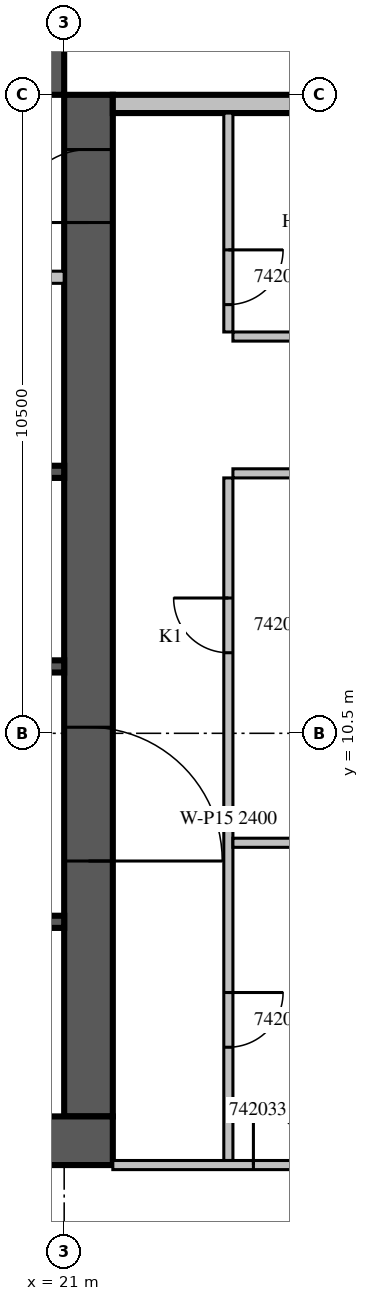
"""IFC4 building model, lengths in metres.
Left out: names, types, materials, properties, quantities, classifications, styles, units other than length and angle.
Written with IfcOpenShell. Run it as: python <this file> out.ifc"""

import sys

from ifc_helpers import new_model, si_unit, direction, frame, frame_2d, origin, place, context, subcontext, project, spatial, rectangle, extrude, source, transform, mapped, element, fill, save


model = new_model("IFC4")
c1 = context("Model", 3, precision=1e-05, world=origin(), true_north=direction((0.0, 1.0)))
c2 = subcontext(c1, "Body", "Model", "MODEL_VIEW")
j1 = project(units=[si_unit("LENGTHUNIT", "METRE"), si_unit("PLANEANGLEUNIT", "RADIAN")], contexts=[c1])
p1 = place(None, origin())
s1 = spatial("IfcSite", under=j1, at=p1, CompositionType="ELEMENT")
p2 = place(p1, origin())
s2 = spatial("IfcBuilding", under=s1, at=p2, CompositionType="ELEMENT")
p3 = place(p2, frame((0.0, 0.0, 193.0)))
s3 = spatial("IfcBuildingStorey", under=s2, at=p3, CompositionType="ELEMENT", Elevation=193.0)
m1 = source(origin(), c2, "Body", "SweptSolid", [
    extrude(rectangle(XDim=16.8, YDim=0.8, at=frame_2d((8.4, 0.0))), origin(), (0.0, 0.0, 1.0), 3.8),
])
p4 = place(p3, frame((21.4, 4.2, 0.0), z_axis=(0.0, 0.0, 1.0), x_axis=(0.0, 1.0, 0.0)))
e1 = element("IfcWall", 1, at=p4, inside=s3, PredefinedType="SHEAR", context=c2, shape_type="MappedRepresentation", body=[
    mapped(m1, transform((0.0, 0.0, 0.0), scale=1.0)),
])
m2 = source(origin(), c2, "Body", "SweptSolid", [
    extrude(rectangle(XDim=2.2, YDim=2.1, at=frame_2d((1.1, 1.05))), frame((0.0, 0.41, 0.0), z_axis=(0.0, -1.0, 0.0), x_axis=(1.0, 0.0, 0.0)), (0.0, 0.0, 1.0), 0.82),
])
p5 = place(p4, frame((4.2, 0.0, 0.0)))
e2 = element("IfcOpeningElement", 2, at=p5, cuts=e1, PredefinedType="OPENING", context=c2, shape_type="MappedRepresentation", body=[
    mapped(m2, transform((0.0, 0.0, 0.0), scale=1.0)),
])
m3 = source(origin(), c2, "Body", "SweptSolid", [
    extrude(rectangle(XDim=1.2, YDim=2.1, at=frame_2d((0.6, 1.05))), frame((0.0, 0.41, 0.0), z_axis=(0.0, -1.0, 0.0), x_axis=(1.0, 0.0, 0.0)), (0.0, 0.0, 1.0), 0.82),
])
p6 = place(p4, frame((14.7, 0.0, 0.0)))
e3 = element("IfcOpeningElement", 3, at=p6, cuts=e1, PredefinedType="OPENING", context=c2, shape_type="MappedRepresentation", body=[
    mapped(m3, transform((0.0, 0.0, 0.0), scale=1.0)),
])
m4 = source(origin(), c2, "Body", "SweptSolid", [
    extrude(rectangle(XDim=17.6, YDim=0.8, at=frame_2d((8.8, 0.0))), origin(), (0.0, 0.0, 1.0), 3.8),
])
p7 = place(p3, frame((4.2, 3.8, 0.0), z_axis=(0.0, 0.0, 1.0), x_axis=(1.0, 0.0, 0.0)))
e4 = element("IfcWall", 4, at=p7, inside=s3, PredefinedType="SHEAR", context=c2, shape_type="MappedRepresentation", body=[
    mapped(m4, transform((0.0, 0.0, 0.0), scale=1.0)),
])
m5 = source(origin(), c2, "Body", "SweptSolid", [
    extrude(rectangle(XDim=0.9, YDim=2.1, at=frame_2d((0.45, 1.05))), frame((0.0, 0.41, 0.0), z_axis=(0.0, -1.0, 0.0), x_axis=(1.0, 0.0, 0.0)), (0.0, 0.0, 1.0), 0.82),
])
p8 = place(p7, frame((12.75, 0.0, 0.0)))
e5 = element("IfcOpeningElement", 5, at=p8, cuts=e4, PredefinedType="OPENING", context=c2, shape_type="MappedRepresentation", body=[
    mapped(m5, transform((0.0, 0.0, 0.0), scale=1.0)),
])
p9 = place(p3, frame((4.2, 21.4, 0.0), z_axis=(0.0, 0.0, 1.0), x_axis=(1.0, 0.0, 0.0)))
e6 = element("IfcWall", 6, at=p9, inside=s3, PredefinedType="SHEAR", context=c2, shape_type="MappedRepresentation", body=[
    mapped(m1, transform((0.0, 0.0, 0.0), scale=1.0)),
])
p10 = place(p9, frame((7.4, 0.0, 0.0)))
e7 = element("IfcOpeningElement", 7, at=p10, cuts=e6, PredefinedType="OPENING", context=c2, shape_type="MappedRepresentation", body=[
    mapped(m3, transform((0.0, 0.0, 0.0), scale=1.0)),
])
m6 = source(origin(), c2, "Body", "SweptSolid", [
    extrude(rectangle(XDim=7.15, YDim=0.3, at=frame_2d((3.575, 0.0))), origin(), (0.0, 0.0, 1.0), 3.4),
])
p11 = place(p3, frame((28.95, 20.85, 0.0), z_axis=(0.0, 0.0, 1.0), x_axis=(-1.0, 0.0, 0.0)))
e8 = element("IfcWall", 8, at=p11, inside=s3, PredefinedType="STANDARD", context=c2, shape_type="MappedRepresentation", body=[
    mapped(m6, transform((0.0, 0.0, 0.0), scale=1.0)),
])
m7 = source(origin(), c2, "Body", "SweptSolid", [
    extrude(rectangle(XDim=3.0, YDim=2.3, at=frame_2d((1.5, 1.15))), frame((0.0, 0.16, 0.0), z_axis=(0.0, -1.0, 0.0), x_axis=(1.0, 0.0, 0.0)), (0.0, 0.0, 1.0), 0.32),
])
p12 = place(p11, frame((0.15, 0.0, 0.6)))
e9 = element("IfcOpeningElement", 9, at=p12, cuts=e8, PredefinedType="OPENING", context=c2, shape_type="MappedRepresentation", body=[
    mapped(m7, transform((0.0, 0.0, 0.0), scale=1.0)),
])
m8 = source(origin(), c2, "Body", "SweptSolid", [
    extrude(rectangle(XDim=2.4, YDim=0.2, at=frame_2d((1.2, 0.0))), origin(), (0.0, 0.0, 1.0), 3.8),
])
p13 = place(p3, frame((18.6, 7.4, 0.0), z_axis=(0.0, 0.0, 1.0), x_axis=(1.0, 0.0, 0.0)))
e10 = element("IfcWall", 10, at=p13, inside=s3, PredefinedType="SOLIDWALL", context=c2, shape_type="MappedRepresentation", body=[
    mapped(m8, transform((0.0, 0.0, 0.0), scale=1.0)),
])
m9 = source(origin(), c2, "Body", "SweptSolid", [
    extrude(rectangle(XDim=9.6, YDim=0.2, at=frame_2d((4.8, 0.0))), origin(), (0.0, 0.0, 1.0), 3.8),
])
p14 = place(p3, frame((11.4, 11.6, 0.0), z_axis=(0.0, 0.0, 1.0), x_axis=(1.0, 0.0, 0.0)))
e11 = element("IfcWall", 11, at=p14, inside=s3, PredefinedType="SOLIDWALL", context=c2, shape_type="MappedRepresentation", body=[
    mapped(m9, transform((0.0, 0.0, 0.0), scale=1.0)),
])
p15 = place(p3, frame((11.4, 14.8, 0.0), z_axis=(0.0, 0.0, 1.0), x_axis=(1.0, 0.0, 0.0)))
e12 = element("IfcWall", 12, at=p15, inside=s3, PredefinedType="SOLIDWALL", context=c2, shape_type="MappedRepresentation", body=[
    mapped(m9, transform((0.0, 0.0, 0.0), scale=1.0)),
])
m10 = source(origin(), c2, "Body", "SweptSolid", [
    extrude(rectangle(XDim=1.1, YDim=2.1, at=frame_2d((0.55, 1.05))), frame((0.0, 0.11, 0.0), z_axis=(0.0, -1.0, 0.0), x_axis=(1.0, 0.0, 0.0)), (0.0, 0.0, 1.0), 0.22),
])
p16 = place(p15, frame((3.05, 0.0, 0.0)))
e13 = element("IfcOpeningElement", 13, at=p16, cuts=e12, PredefinedType="OPENING", context=c2, shape_type="MappedRepresentation", body=[
    mapped(m10, transform((0.0, 0.0, 0.0), scale=1.0)),
])
p17 = place(p15, frame((5.45, 0.0, 0.0)))
e14 = element("IfcOpeningElement", 14, at=p17, cuts=e12, PredefinedType="OPENING", context=c2, shape_type="MappedRepresentation", body=[
    mapped(m10, transform((0.0, 0.0, 0.0), scale=1.0)),
])
p18 = place(p15, frame((7.85, 0.0, 0.0)))
e15 = element("IfcOpeningElement", 15, at=p18, cuts=e12, PredefinedType="OPENING", context=c2, shape_type="MappedRepresentation", body=[
    mapped(m10, transform((0.0, 0.0, 0.0), scale=1.0)),
])
m11 = source(origin(), c2, "Body", "SweptSolid", [
    extrude(rectangle(XDim=11.45, YDim=0.2, at=frame_2d((5.725, 0.0))), origin(), (0.0, 0.0, 1.0), 3.4),
])
p19 = place(p3, frame((9.55, 18.0, 0.0), z_axis=(0.0, 0.0, 1.0), x_axis=(1.0, 0.0, 0.0)))
e16 = element("IfcWall", 16, at=p19, inside=s3, PredefinedType="PARTITIONING", context=c2, shape_type="MappedRepresentation", body=[
    mapped(m11, transform((0.0, 0.0, 0.0), scale=1.0)),
])
m12 = source(origin(), c2, "Body", "SweptSolid", [
    extrude(rectangle(XDim=0.9, YDim=2.1, at=frame_2d((0.45, 1.05))), frame((0.0, 0.11, 0.0), z_axis=(0.0, -1.0, 0.0), x_axis=(1.0, 0.0, 0.0)), (0.0, 0.0, 1.0), 0.22),
])
p20 = place(p19, frame((0.475, 0.0, 0.0)))
e17 = element("IfcOpeningElement", 17, at=p20, cuts=e16, PredefinedType="OPENING", context=c2, shape_type="MappedRepresentation", body=[
    mapped(m12, transform((0.0, 0.0, 0.0), scale=1.0)),
])
p21 = place(p19, frame((1.85, 0.0, 0.0)))
e18 = element("IfcOpeningElement", 18, at=p21, cuts=e16, PredefinedType="OPENING", context=c2, shape_type="MappedRepresentation", body=[
    mapped(m12, transform((0.0, 0.0, 0.0), scale=1.0)),
])
p22 = place(p19, frame((3.125, 0.0, 0.0)))
e19 = element("IfcOpeningElement", 19, at=p22, cuts=e16, PredefinedType="OPENING", context=c2, shape_type="MappedRepresentation", body=[
    mapped(m12, transform((0.0, 0.0, 0.0), scale=1.0)),
])
p23 = place(p19, frame((7.35, 0.0, 0.0)))
e20 = element("IfcOpeningElement", 20, at=p23, cuts=e16, PredefinedType="OPENING", context=c2, shape_type="MappedRepresentation", body=[
    mapped(m10, transform((0.0, 0.0, 0.0), scale=1.0)),
])
p24 = place(p3, frame((23.7, 14.7, 0.0), z_axis=(0.0, 0.0, 1.0), x_axis=(0.0, -1.0, 0.0)))
e21 = element("IfcWall", 21, at=p24, inside=s3, PredefinedType="PARTITIONING", context=c2, shape_type="SweptSolid", body=[
    extrude(rectangle(XDim=11.225, YDim=0.15, at=frame_2d((5.612, 0.0))), origin(), (0.0, 0.0, 1.0), 2.4),
])
m13 = source(origin(), c2, "Body", "SweptSolid", [
    extrude(rectangle(XDim=0.9, YDim=2.1, at=frame_2d((0.45, 1.05))), frame((0.0, 0.085, 0.0), z_axis=(0.0, -1.0, 0.0), x_axis=(1.0, 0.0, 0.0)), (0.0, 0.0, 1.0), 0.17),
])
p25 = place(p24, frame((8.463, 0.0, 0.0)))
e22 = element("IfcOpeningElement", 22, at=p25, cuts=e21, PredefinedType="OPENING", context=c2, shape_type="MappedRepresentation", body=[
    mapped(m13, transform((0.0, 0.0, 0.0), scale=1.0)),
])
p26 = place(p24, frame((1.975, 0.0, 0.0)))
e23 = element("IfcOpeningElement", 23, at=p26, cuts=e21, PredefinedType="OPENING", context=c2, shape_type="MappedRepresentation", body=[
    mapped(m13, transform((0.0, 0.0, 0.0), scale=1.0)),
])
m14 = source(origin(), c2, "Body", "SweptSolid", [
    extrude(rectangle(XDim=3.6, YDim=0.15, at=frame_2d((1.8, 0.0))), origin(), (0.0, 0.0, 1.0), 3.4),
])
p27 = place(p3, frame((23.7, 20.7, 0.0), z_axis=(0.0, 0.0, 1.0), x_axis=(0.0, -1.0, 0.0)))
e24 = element("IfcWall", 24, at=p27, inside=s3, PredefinedType="PARTITIONING", context=c2, shape_type="MappedRepresentation", body=[
    mapped(m14, transform((0.0, 0.0, 0.0), scale=1.0)),
])
p28 = place(p27, frame((2.25, 0.0, 0.0)))
e25 = element("IfcOpeningElement", 25, at=p28, cuts=e24, PredefinedType="OPENING", context=c2, shape_type="MappedRepresentation", body=[
    mapped(m13, transform((0.0, 0.0, 0.0), scale=1.0)),
])
m15 = source(origin(), c2, "Body", "SweptSolid", [
    extrude(rectangle(XDim=5.55, YDim=0.15, at=frame_2d((2.775, 0.0))), origin(), (0.0, 0.0, 1.0), 3.4),
])
for number, where, z_axis, x_axis in (
    (26, (29.325, 8.7, 0.0), (0.0, 0.0, 1.0), (-1.0, 0.0, 0.0)),
    (27, (29.325, 14.775, 0.0), (0.0, 0.0, 1.0), (-1.0, 0.0, 0.0)),
    (28, (23.775, 17.025, 0.0), (0.0, 0.0, 1.0), (1.0, 0.0, 0.0)),
):
    element("IfcWall", number, at=place(p3, frame(where, z_axis=z_axis, x_axis=x_axis)), inside=s3, PredefinedType="PARTITIONING", context=c2, shape_type="MappedRepresentation", body=[
        mapped(m15, transform((0.0, 0.0, 0.0), scale=1.0)),
    ])
m16 = source(origin(), c2, "Body", "SweptSolid", [
    extrude(rectangle(XDim=7.525, YDim=0.15, at=frame_2d((3.763, 0.0))), origin(), (0.0, 0.0, 1.0), 3.4),
])
p29 = place(p3, frame((21.8, 3.4, 0.0), z_axis=(0.0, 0.0, 1.0), x_axis=(1.0, 0.0, 0.0)))
e29 = element("IfcWall", 29, at=p29, inside=s3, PredefinedType="PARTITIONING", context=c2, shape_type="MappedRepresentation", body=[
    mapped(m16, transform((0.0, 0.0, 0.0), scale=1.0)),
])
m17 = source(origin(), c2, "Body", "SweptSolid", [
    extrude(rectangle(XDim=1.0, YDim=2.1, at=frame_2d((0.5, 1.05))), frame((0.0, 0.085, 0.0), z_axis=(0.0, -1.0, 0.0), x_axis=(1.0, 0.0, 0.0)), (0.0, 0.0, 1.0), 0.17),
])
p30 = place(p29, frame((3.3, 0.0, 0.0)))
e30 = element("IfcOpeningElement", 30, at=p30, cuts=e29, PredefinedType="OPENING", context=c2, shape_type="MappedRepresentation", body=[
    mapped(m17, transform((0.0, 0.0, 0.0), scale=1.0)),
])
p31 = place(p29, frame((2.312, 0.0, 0.0)))
e31 = element("IfcOpeningElement", 31, at=p31, cuts=e29, PredefinedType="OPENING", context=c2, shape_type="MappedRepresentation", body=[
    mapped(m13, transform((0.0, 0.0, 0.0), scale=1.0)),
])
m18 = source(origin(), c2, "Body", "SweptSolid", [
    extrude(rectangle(XDim=2.2, YDim=2.1, at=frame_2d((1.1, 1.05))), frame((0.0, 0.025, 0.0), z_axis=(0.0, -1.0, 0.0), x_axis=(1.0, 0.0, 0.0)), (0.0, 0.0, 1.0), 0.05),
])
p32 = place(p5, origin())
e32 = element("IfcDoor", 32, at=p32, inside=s3, OperationType="DOUBLE_DOOR_SINGLE_SWING", PredefinedType="DOOR", context=c2, shape_type="MappedRepresentation", body=[
    mapped(m18, transform((0.0, 0.0, 0.0), scale=1.0)),
])
fill(e2, e32)
m19 = source(origin(), c2, "Body", "SweptSolid", [
    extrude(rectangle(XDim=1.2, YDim=2.1, at=frame_2d((0.6, 1.05))), frame((0.0, 0.025, 0.0), z_axis=(0.0, -1.0, 0.0), x_axis=(1.0, 0.0, 0.0)), (0.0, 0.0, 1.0), 0.05),
])
p33 = place(p6, origin())
e33 = element("IfcDoor", 33, at=p33, inside=s3, OperationType="SINGLE_SWING_LEFT", PredefinedType="DOOR", context=c2, shape_type="MappedRepresentation", body=[
    mapped(m19, transform((0.0, 0.0, 0.0), scale=1.0)),
])
fill(e3, e33)
m20 = source(origin(), c2, "Body", "SweptSolid", [
    extrude(rectangle(XDim=0.9, YDim=2.1, at=frame_2d((0.45, 1.05))), frame((0.0, 0.025, 0.0), z_axis=(0.0, -1.0, 0.0), x_axis=(1.0, 0.0, 0.0)), (0.0, 0.0, 1.0), 0.05),
])
p34 = place(p25, origin())
e34 = element("IfcDoor", 34, at=p34, inside=s3, OperationType="SINGLE_SWING_LEFT", PredefinedType="DOOR", context=c2, shape_type="MappedRepresentation", body=[
    mapped(m20, transform((0.0, 0.0, 0.0), scale=1.0)),
])
fill(e22, e34)
p35 = place(p26, origin())
e35 = element("IfcDoor", 35, at=p35, inside=s3, OperationType="SINGLE_SWING_RIGHT", PredefinedType="DOOR", context=c2, shape_type="MappedRepresentation", body=[
    mapped(m20, transform((0.0, 0.0, 0.0), scale=1.0)),
])
fill(e23, e35)
p36 = place(p28, origin())
e36 = element("IfcDoor", 36, at=p36, inside=s3, OperationType="SINGLE_SWING_LEFT", PredefinedType="DOOR", context=c2, shape_type="MappedRepresentation", body=[
    mapped(m20, transform((0.0, 0.0, 0.0), scale=1.0)),
])
fill(e25, e36)
p37 = place(p31, origin())
e37 = element("IfcDoor", 37, at=p37, inside=s3, OperationType="SINGLE_SWING_LEFT", PredefinedType="DOOR", context=c2, shape_type="MappedRepresentation", body=[
    mapped(m20, transform((0.0, 0.0, 0.0), scale=1.0)),
])
fill(e31, e37)
save(model, sys.argv[1])
